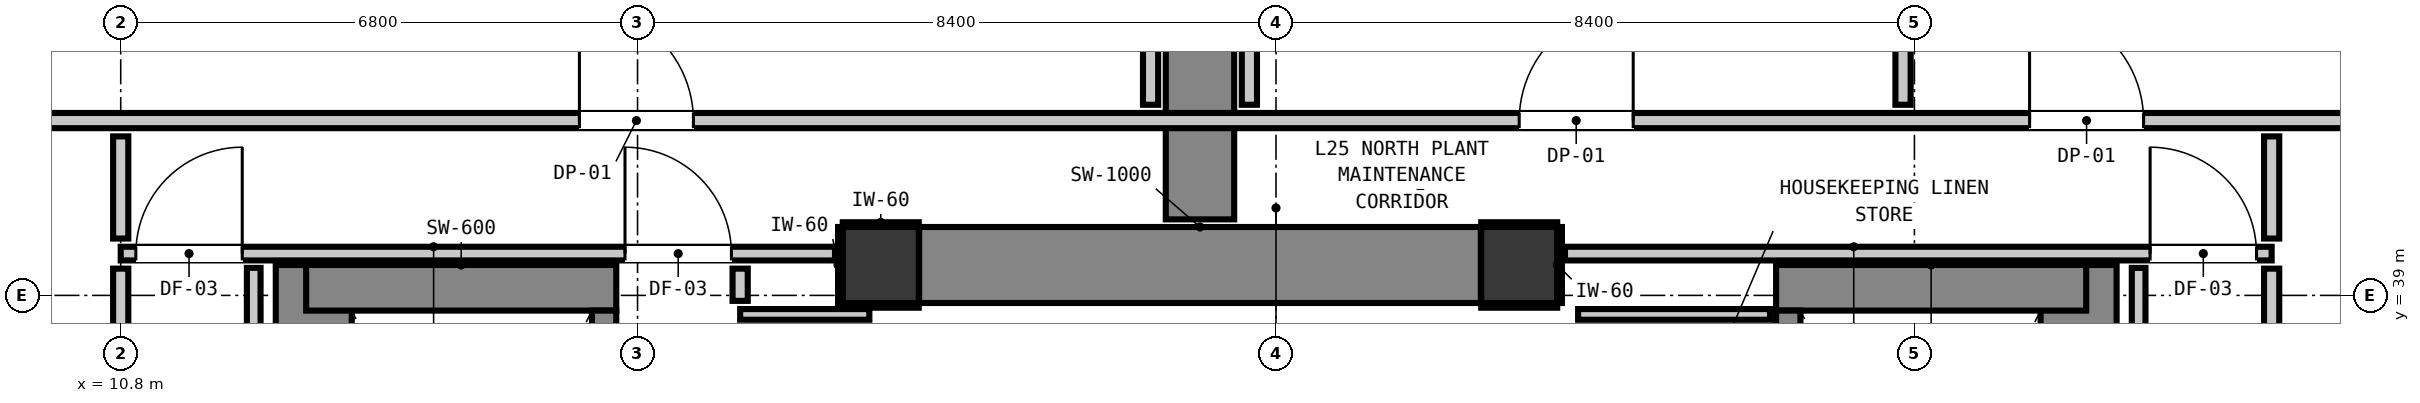
"""IFC4 building model, lengths in metres.
Left out: names, types, materials, properties, quantities, classifications, styles, units other than length and angle.
Written with IfcOpenShell. Run it as: python <this file> out.ifc"""

import sys

from ifc_helpers import new_model, si_unit, direction, frame, frame_2d, origin, origin_2d, place, context, subcontext, project, spatial, rectangle, extrude, element, fill, save


model = new_model("IFC4")
c1 = context("Model", 3, precision=1e-05, world=origin(), true_north=direction((0.0, 1.0)))
c2 = subcontext(c1, "Body", "Model", "MODEL_VIEW")
j1 = project(units=[si_unit("LENGTHUNIT", "METRE"), si_unit("PLANEANGLEUNIT", "RADIAN")], contexts=[c1])
p1 = place(None, origin())
s1 = spatial("IfcSite", under=j1, at=p1, CompositionType="ELEMENT")
p2 = place(p1, origin())
s2 = spatial("IfcBuilding", under=s1, at=p2, CompositionType="ELEMENT")
p3 = place(p2, frame((0.0, 0.0, 88.4)))
s3 = spatial("IfcBuildingStorey", under=s2, at=p3, CompositionType="ELEMENT", Elevation=88.4)
for number, where, z_axis, x_axis in (
    (1, (20.8, 39.4, 0.0), (0.0, 0.0, 1.0), (1.0, 0.0, 0.0)),
    (2, (29.2, 39.4, 0.0), (0.0, 0.0, 1.0), (1.0, 0.0, 0.0)),
):
    element("IfcColumn", number, at=place(p3, frame(where, z_axis=z_axis, x_axis=x_axis)), inside=s3, PredefinedType="COLUMN", context=c2, shape_type="SweptSolid", body=[
        extrude(rectangle(XDim=1.0, YDim=1.0, at=origin_2d()), origin(), (0.0, 0.0, 1.0), 4.4),
    ])
p4 = place(p3, frame((13.34, 31.205, 0.0), z_axis=(0.0, 0.0, 1.0), x_axis=(0.0, 1.0, 0.0)))
e3 = element("IfcWall", 3, at=p4, inside=s3, PredefinedType="SHEAR", context=c2, shape_type="SweptSolid", body=[
    extrude(rectangle(XDim=8.195, YDim=1.0, at=frame_2d((4.097, 0.0))), origin(), (0.0, 0.0, 1.0), 4.4),
])
p5 = place(p3, frame((13.24, 39.1, 0.0), z_axis=(0.0, 0.0, 1.0), x_axis=(1.0, 0.0, 0.0)))
e4 = element("IfcWall", 4, at=p5, inside=s3, PredefinedType="SHEAR", context=c2, shape_type="SweptSolid", body=[
    extrude(rectangle(XDim=4.08, YDim=0.6, at=frame_2d((2.04, 0.0))), origin(), (0.0, 0.0, 1.0), 4.4),
])
p6 = place(p3, frame((36.56, 31.205, 0.0), z_axis=(0.0, 0.0, 1.0), x_axis=(0.0, 1.0, 0.0)))
e5 = element("IfcWall", 5, at=p6, inside=s3, PredefinedType="SHEAR", context=c2, shape_type="SweptSolid", body=[
    extrude(rectangle(XDim=8.195, YDim=1.0, at=frame_2d((4.097, 0.0))), origin(), (0.0, 0.0, 1.0), 4.4),
])
p7 = place(p3, frame((32.58, 39.1, 0.0), z_axis=(0.0, 0.0, 1.0), x_axis=(1.0, 0.0, 0.0)))
e6 = element("IfcWall", 6, at=p7, inside=s3, PredefinedType="SHEAR", context=c2, shape_type="SweptSolid", body=[
    extrude(rectangle(XDim=4.08, YDim=0.6, at=frame_2d((2.04, 0.0))), origin(), (0.0, 0.0, 1.0), 4.4),
])
p8 = place(p3, frame((21.305, 39.4, 0.0), z_axis=(0.0, 0.0, 1.0), x_axis=(1.0, 0.0, 0.0)))
e7 = element("IfcWall", 7, at=p8, inside=s3, PredefinedType="SHEAR", context=c2, shape_type="SweptSolid", body=[
    extrude(rectangle(XDim=7.39, YDim=1.0, at=frame_2d((3.695, 0.0))), origin(), (0.0, 0.0, 1.0), 4.4),
])
p9 = place(p3, frame((17.16, 31.0, 0.0), z_axis=(0.0, 0.0, 1.0), x_axis=(0.0, 1.0, 0.0)))
e8 = element("IfcWall", 8, at=p9, inside=s3, PredefinedType="SHEAR", context=c2, shape_type="SweptSolid", body=[
    extrude(rectangle(XDim=7.8, YDim=0.32, at=frame_2d((3.9, 0.0))), origin(), (0.0, 0.0, 1.0), 4.4),
])
p10 = place(p9, frame((0.19, 0.0, 0.0)))
e9 = element("IfcOpeningElement", 9, at=p10, cuts=e8, PredefinedType="OPENING", context=c2, shape_type="SweptSolid", body=[
    extrude(rectangle(XDim=1.1, YDim=2.15, at=frame_2d((0.55, 1.075))), frame((0.0, 0.17, 0.0), z_axis=(0.0, -1.0, 0.0), x_axis=(1.0, 0.0, 0.0)), (0.0, 0.0, 1.0), 0.34),
])
p11 = place(p3, frame((32.74, 31.0, 0.0), z_axis=(0.0, 0.0, 1.0), x_axis=(0.0, 1.0, 0.0)))
e10 = element("IfcWall", 10, at=p11, inside=s3, PredefinedType="SHEAR", context=c2, shape_type="SweptSolid", body=[
    extrude(rectangle(XDim=7.8, YDim=0.32, at=frame_2d((3.9, 0.0))), origin(), (0.0, 0.0, 1.0), 4.4),
])
p12 = place(p11, frame((0.19, 0.0, 0.0)))
e11 = element("IfcOpeningElement", 11, at=p12, cuts=e10, PredefinedType="OPENING", context=c2, shape_type="SweptSolid", body=[
    extrude(rectangle(XDim=1.1, YDim=2.15, at=frame_2d((0.55, 1.075))), frame((0.0, 0.17, 0.0), z_axis=(0.0, -1.0, 0.0), x_axis=(1.0, 0.0, 0.0)), (0.0, 0.0, 1.0), 0.34),
])
p13 = place(p3, frame((25.0, 40.0, 0.0), z_axis=(0.0, 0.0, 1.0), x_axis=(0.0, 1.0, 0.0)))
e12 = element("IfcWall", 12, at=p13, inside=s3, PredefinedType="SHEAR", context=c2, shape_type="SweptSolid", body=[
    extrude(rectangle(XDim=12.25, YDim=0.9, at=frame_2d((6.125, 0.0))), origin(), (0.0, 0.0, 1.0), 4.14),
])
p14 = place(p3, frame((2.95, 41.3, 0.0), z_axis=(0.0, 0.0, 1.0), x_axis=(1.0, 0.0, 0.0)))
e13 = element("IfcWall", 13, at=p14, inside=s3, PredefinedType="PARTITIONING", context=c2, shape_type="SweptSolid", body=[
    extrude(rectangle(XDim=39.9, YDim=0.2, at=frame_2d((19.95, 0.0))), origin(), (0.0, 0.0, 1.0), 4.14),
])
p15 = place(p14, frame((26.25, 0.0, 0.0)))
e14 = element("IfcOpeningElement", 14, at=p15, cuts=e13, PredefinedType="OPENING", context=c2, shape_type="SweptSolid", body=[
    extrude(rectangle(XDim=1.5, YDim=2.15, at=frame_2d((0.75, 1.075))), frame((0.0, 0.11, 0.0), z_axis=(0.0, -1.0, 0.0), x_axis=(1.0, 0.0, 0.0)), (0.0, 0.0, 1.0), 0.22),
])
p16 = place(p14, frame((32.965, 0.0, 0.0)))
e15 = element("IfcOpeningElement", 15, at=p16, cuts=e13, PredefinedType="OPENING", context=c2, shape_type="SweptSolid", body=[
    extrude(rectangle(XDim=1.5, YDim=2.15, at=frame_2d((0.75, 1.075))), frame((0.0, 0.11, 0.0), z_axis=(0.0, -1.0, 0.0), x_axis=(1.0, 0.0, 0.0)), (0.0, 0.0, 1.0), 0.22),
])
p17 = place(p14, frame((13.885, 0.0, 0.0)))
e16 = element("IfcOpeningElement", 16, at=p17, cuts=e13, PredefinedType="OPENING", context=c2, shape_type="SweptSolid", body=[
    extrude(rectangle(XDim=1.5, YDim=2.15, at=frame_2d((0.75, 1.075))), frame((0.0, 0.11, 0.0), z_axis=(0.0, -1.0, 0.0), x_axis=(1.0, 0.0, 0.0)), (0.0, 0.0, 1.0), 0.22),
])
p18 = place(p3, frame((10.8, 39.55, 0.0), z_axis=(0.0, 0.0, 1.0), x_axis=(1.0, 0.0, 0.0)))
e17 = element("IfcWall", 17, at=p18, inside=s3, PredefinedType="PARTITIONING", context=c2, shape_type="SweptSolid", body=[
    extrude(rectangle(XDim=9.398, YDim=0.18, at=frame_2d((4.699, 0.0))), origin(), (0.0, 0.0, 1.0), 3.878),
])
p19 = place(p18, frame((6.635, 0.0, 0.0)))
e18 = element("IfcOpeningElement", 18, at=p19, cuts=e17, PredefinedType="OPENING", context=c2, shape_type="SweptSolid", body=[
    extrude(rectangle(XDim=1.4, YDim=2.15, at=frame_2d((0.7, 1.075))), frame((0.0, 0.1, 0.0), z_axis=(0.0, -1.0, 0.0), x_axis=(1.0, 0.0, 0.0)), (0.0, 0.0, 1.0), 0.2),
])
p20 = place(p18, frame((0.199, 0.0, 0.0)))
e19 = element("IfcOpeningElement", 19, at=p20, cuts=e17, PredefinedType="OPENING", context=c2, shape_type="SweptSolid", body=[
    extrude(rectangle(XDim=1.4, YDim=2.15, at=frame_2d((0.7, 1.075))), frame((0.0, 0.1, 0.0), z_axis=(0.0, -1.0, 0.0), x_axis=(1.0, 0.0, 0.0)), (0.0, 0.0, 1.0), 0.2),
])
p21 = place(p3, frame((29.802, 39.55, 0.0), z_axis=(0.0, 0.0, 1.0), x_axis=(1.0, 0.0, 0.0)))
e20 = element("IfcWall", 20, at=p21, inside=s3, PredefinedType="PARTITIONING", context=c2, shape_type="SweptSolid", body=[
    extrude(rectangle(XDim=9.298, YDim=0.18, at=frame_2d((4.649, 0.0))), origin(), (0.0, 0.0, 1.0), 3.878),
])
p22 = place(p21, frame((7.699, 0.0, 0.0)))
e21 = element("IfcOpeningElement", 21, at=p22, cuts=e20, PredefinedType="OPENING", context=c2, shape_type="SweptSolid", body=[
    extrude(rectangle(XDim=1.4, YDim=2.15, at=frame_2d((0.7, 1.075))), frame((0.0, 0.1, 0.0), z_axis=(0.0, -1.0, 0.0), x_axis=(1.0, 0.0, 0.0)), (0.0, 0.0, 1.0), 0.2),
])
p23 = place(p3, frame((18.95, 38.75, 0.0), z_axis=(0.0, 0.0, 1.0), x_axis=(1.0, 0.0, 0.0)))
e22 = element("IfcWall", 22, at=p23, inside=s3, PredefinedType="PARTITIONING", context=c2, shape_type="SweptSolid", body=[
    extrude(rectangle(XDim=1.7, YDim=0.14, at=frame_2d((0.85, 0.0))), origin(), (0.0, 0.0, 1.0), 4.14),
])
p24 = place(p3, frame((29.975, 38.75, 0.0), z_axis=(0.0, 0.0, 1.0), x_axis=(1.0, 0.0, 0.0)))
e23 = element("IfcWall", 23, at=p24, inside=s3, PredefinedType="PARTITIONING", context=c2, shape_type="SweptSolid", body=[
    extrude(rectangle(XDim=2.525, YDim=0.14, at=frame_2d((1.262, 0.0))), origin(), (0.0, 0.0, 1.0), 4.14),
])
p25 = place(p3, frame((10.8, 30.008, 0.0), z_axis=(0.0, 0.0, 1.0), x_axis=(0.0, 1.0, 0.0)))
e24 = element("IfcWall", 24, at=p25, inside=s3, PredefinedType="PARTITIONING", context=c2, shape_type="SweptSolid", body=[
    extrude(rectangle(XDim=9.344, YDim=0.2, at=frame_2d((4.672, 0.0))), origin(), (0.0, 0.0, 1.0), 4.14),
])
p26 = place(p3, frame((10.8, 39.748, 0.0), z_axis=(0.0, 0.0, 1.0), x_axis=(0.0, 1.0, 0.0)))
e25 = element("IfcWall", 25, at=p26, inside=s3, PredefinedType="PARTITIONING", context=c2, shape_type="SweptSolid", body=[
    extrude(rectangle(XDim=1.344, YDim=0.2, at=frame_2d((0.672, 0.0))), origin(), (0.0, 0.0, 1.0), 4.14),
])
p27 = place(p3, frame((18.95, 38.928, 0.0), z_axis=(0.0, 0.0, 1.0), x_axis=(0.0, 1.0, 0.0)))
e26 = element("IfcWall", 26, at=p27, inside=s3, PredefinedType="PARTITIONING", context=c2, shape_type="SweptSolid", body=[
    extrude(rectangle(XDim=0.424, YDim=0.2, at=frame_2d((0.212, 0.0))), origin(), (0.0, 0.0, 1.0), 4.14),
])
for number, where, z_axis, x_axis in (
    (27, (24.35, 41.508, 0.0), (0.0, 0.0, 1.0), (0.0, 1.0, 0.0)),
    (28, (25.65, 41.508, 0.0), (0.0, 0.0, 1.0), (0.0, 1.0, 0.0)),
    (29, (34.25, 41.508, 0.0), (0.0, 0.0, 1.0), (0.0, 1.0, 0.0)),
):
    element("IfcWall", number, at=place(p3, frame(where, z_axis=z_axis, x_axis=x_axis)), inside=s3, PredefinedType="PARTITIONING", context=c2, shape_type="SweptSolid", body=[
        extrude(rectangle(XDim=10.534, YDim=0.2, at=frame_2d((5.267, 0.0))), origin(), (0.0, 0.0, 1.0), 4.14),
    ])
p28 = place(p3, frame((39.1, 30.008, 0.0), z_axis=(0.0, 0.0, 1.0), x_axis=(0.0, 1.0, 0.0)))
e30 = element("IfcWall", 30, at=p28, inside=s3, PredefinedType="PARTITIONING", context=c2, shape_type="SweptSolid", body=[
    extrude(rectangle(XDim=9.344, YDim=0.2, at=frame_2d((4.672, 0.0))), origin(), (0.0, 0.0, 1.0), 4.14),
])
p29 = place(p3, frame((39.1, 39.748, 0.0), z_axis=(0.0, 0.0, 1.0), x_axis=(0.0, 1.0, 0.0)))
e31 = element("IfcWall", 31, at=p29, inside=s3, PredefinedType="PARTITIONING", context=c2, shape_type="SweptSolid", body=[
    extrude(rectangle(XDim=1.344, YDim=0.2, at=frame_2d((0.672, 0.0))), origin(), (0.0, 0.0, 1.0), 4.14),
])
for number, where, z_axis, x_axis in (
    (32, (12.55, 22.068, 0.0), (0.0, 0.0, 1.0), (0.0, 1.0, 0.0)),
    (33, (37.35, 22.068, 0.0), (0.0, 0.0, 1.0), (0.0, 1.0, 0.0)),
):
    element("IfcWall", number, at=place(p3, frame(where, z_axis=z_axis, x_axis=x_axis)), inside=s3, PredefinedType="PARTITIONING", context=c2, shape_type="SweptSolid", body=[
        extrude(rectangle(XDim=17.294, YDim=0.18, at=frame_2d((8.647, 0.0))), origin(), (0.0, 0.0, 1.0), 4.14),
    ])
for number, where, z_axis, x_axis in (
    (34, (20.3, 38.868, 0.0), (0.0, 0.0, 1.0), (1.0, 0.0, 0.0)),
    (35, (20.3, 39.932, 0.0), (0.0, 0.0, 1.0), (1.0, 0.0, 0.0)),
    (36, (20.268, 38.9, 0.0), (0.0, 0.0, 1.0), (0.0, 1.0, 0.0)),
    (37, (28.7, 38.868, 0.0), (0.0, 0.0, 1.0), (1.0, 0.0, 0.0)),
    (38, (28.7, 39.932, 0.0), (0.0, 0.0, 1.0), (1.0, 0.0, 0.0)),
    (39, (29.732, 38.9, 0.0), (0.0, 0.0, 1.0), (0.0, 1.0, 0.0)),
):
    element("IfcWall", number, at=place(p3, frame(where, z_axis=z_axis, x_axis=x_axis)), inside=s3, PredefinedType="PARTITIONING", context=c2, shape_type="SweptSolid", body=[
        extrude(rectangle(XDim=1.0, YDim=0.06, at=frame_2d((0.5, 0.0))), origin(), (0.0, 0.0, 1.0), 1.45),
    ])
p30 = place(p19, origin())
e40 = element("IfcDoor", 40, at=p30, inside=s3, OperationType="SINGLE_SWING_LEFT", PredefinedType="DOOR", context=c2, shape_type="SweptSolid", body=[
    extrude(rectangle(XDim=1.4, YDim=2.15, at=frame_2d((0.7, 1.075))), frame((0.0, 0.025, 0.0), z_axis=(0.0, -1.0, 0.0), x_axis=(1.0, 0.0, 0.0)), (0.0, 0.0, 1.0), 0.05),
])
fill(e18, e40)
p31 = place(p20, origin())
e41 = element("IfcDoor", 41, at=p31, inside=s3, OperationType="SINGLE_SWING_RIGHT", PredefinedType="DOOR", context=c2, shape_type="SweptSolid", body=[
    extrude(rectangle(XDim=1.4, YDim=2.15, at=frame_2d((0.7, 1.075))), frame((0.0, 0.025, 0.0), z_axis=(0.0, -1.0, 0.0), x_axis=(1.0, 0.0, 0.0)), (0.0, 0.0, 1.0), 0.05),
])
fill(e19, e41)
p32 = place(p22, origin())
e42 = element("IfcDoor", 42, at=p32, inside=s3, OperationType="SINGLE_SWING_LEFT", PredefinedType="DOOR", context=c2, shape_type="SweptSolid", body=[
    extrude(rectangle(XDim=1.4, YDim=2.15, at=frame_2d((0.7, 1.075))), frame((0.0, 0.025, 0.0), z_axis=(0.0, -1.0, 0.0), x_axis=(1.0, 0.0, 0.0)), (0.0, 0.0, 1.0), 0.05),
])
fill(e21, e42)
p33 = place(p15, origin())
e43 = element("IfcDoor", 43, at=p33, inside=s3, OperationType="SINGLE_SWING_RIGHT", PredefinedType="DOOR", context=c2, shape_type="SweptSolid", body=[
    extrude(rectangle(XDim=1.5, YDim=2.15, at=frame_2d((0.75, 1.075))), frame((0.0, 0.025, 0.0), z_axis=(0.0, -1.0, 0.0), x_axis=(1.0, 0.0, 0.0)), (0.0, 0.0, 1.0), 0.05),
])
fill(e14, e43)
p34 = place(p16, origin())
e44 = element("IfcDoor", 44, at=p34, inside=s3, OperationType="SINGLE_SWING_LEFT", PredefinedType="DOOR", context=c2, shape_type="SweptSolid", body=[
    extrude(rectangle(XDim=1.5, YDim=2.15, at=frame_2d((0.75, 1.075))), frame((0.0, 0.025, 0.0), z_axis=(0.0, -1.0, 0.0), x_axis=(1.0, 0.0, 0.0)), (0.0, 0.0, 1.0), 0.05),
])
fill(e15, e44)
p35 = place(p17, origin())
e45 = element("IfcDoor", 45, at=p35, inside=s3, OperationType="SINGLE_SWING_LEFT", PredefinedType="DOOR", context=c2, shape_type="SweptSolid", body=[
    extrude(rectangle(XDim=1.5, YDim=2.15, at=frame_2d((0.75, 1.075))), frame((0.0, 0.025, 0.0), z_axis=(0.0, -1.0, 0.0), x_axis=(1.0, 0.0, 0.0)), (0.0, 0.0, 1.0), 0.05),
])
fill(e16, e45)
save(model, sys.argv[1])
